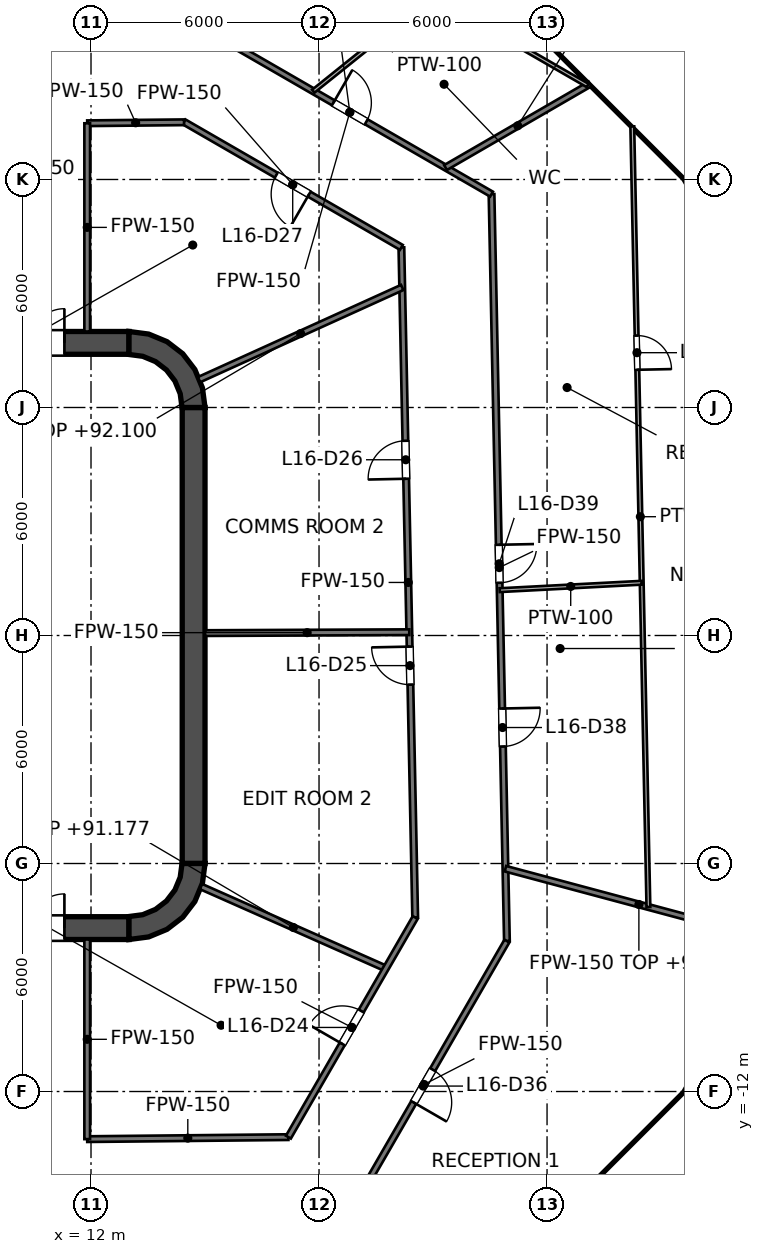
"""IFC4 building model, lengths in metres.
Left out: names, types, materials, properties, quantities, classifications, styles, units other than length and angle.
Written with IfcOpenShell. Run it as: python <this file> out.ifc"""

import sys

from ifc_helpers import new_model, si_unit, direction, frame, frame_2d, origin, place, context, subcontext, project, spatial, polyline, rectangle, outline, extrude, element, fill, save


model = new_model("IFC4")
c1 = context("Model", 3, precision=1e-05, world=origin(), true_north=direction((0.0, 1.0)))
c2 = subcontext(c1, "Body", "Model", "MODEL_VIEW")
j1 = project(units=[si_unit("LENGTHUNIT", "METRE"), si_unit("PLANEANGLEUNIT", "RADIAN")], contexts=[c1])
p1 = place(None, origin())
s1 = spatial("IfcSite", under=j1, at=p1, CompositionType="ELEMENT")
p2 = place(p1, origin())
s2 = spatial("IfcBuilding", under=s1, at=p2, CompositionType="ELEMENT")
p3 = place(p2, frame((0.0, 0.0, 88.2)))
s3 = spatial("IfcBuildingStorey", under=s2, at=p3, CompositionType="ELEMENT", Elevation=88.2)
p4 = place(p3, frame((-13.0, 7.7, 0.0), z_axis=(0.0, 0.0, 1.0), x_axis=(1.0, 0.0, 0.0)))
e1 = element("IfcWall", 1, at=p4, inside=s3, PredefinedType="SHEAR", context=c2, shape_type="SweptSolid", body=[
    extrude(rectangle(XDim=26.0, YDim=0.6, at=frame_2d((13.0, 0.0))), origin(), (0.0, 0.0, 1.0), 4.2),
])
p5 = place(p4, frame((1.7, 0.0, 0.0)))
e2 = element("IfcOpeningElement", 2, at=p5, cuts=e1, PredefinedType="OPENING", context=c2, shape_type="SweptSolid", body=[
    extrude(rectangle(XDim=1.8, YDim=2.1, at=frame_2d((0.9, 1.05))), frame((0.0, 0.3, 0.0), z_axis=(0.0, -1.0, 0.0), x_axis=(1.0, 0.0, 0.0)), (0.0, 0.0, 1.0), 0.6),
])
p6 = place(p4, frame((22.5, 0.0, 0.0)))
e3 = element("IfcOpeningElement", 3, at=p6, cuts=e1, PredefinedType="OPENING", context=c2, shape_type="SweptSolid", body=[
    extrude(rectangle(XDim=1.8, YDim=2.1, at=frame_2d((0.9, 1.05))), frame((0.0, 0.3, 0.0), z_axis=(0.0, -1.0, 0.0), x_axis=(1.0, 0.0, 0.0)), (0.0, 0.0, 1.0), 0.6),
])
p7 = place(p3, frame((-13.0, -7.7, 0.0), z_axis=(0.0, 0.0, 1.0), x_axis=(1.0, 0.0, 0.0)))
e4 = element("IfcWall", 4, at=p7, inside=s3, PredefinedType="SHEAR", context=c2, shape_type="SweptSolid", body=[
    extrude(rectangle(XDim=26.0, YDim=0.6, at=frame_2d((13.0, 0.0))), origin(), (0.0, 0.0, 1.0), 4.2),
])
p8 = place(p7, frame((1.7, 0.0, 0.0)))
e5 = element("IfcOpeningElement", 5, at=p8, cuts=e4, PredefinedType="OPENING", context=c2, shape_type="SweptSolid", body=[
    extrude(rectangle(XDim=1.8, YDim=2.1, at=frame_2d((0.9, 1.05))), frame((0.0, 0.3, 0.0), z_axis=(0.0, -1.0, 0.0), x_axis=(1.0, 0.0, 0.0)), (0.0, 0.0, 1.0), 0.6),
])
p9 = place(p7, frame((22.5, 0.0, 0.0)))
e6 = element("IfcOpeningElement", 6, at=p9, cuts=e4, PredefinedType="OPENING", context=c2, shape_type="SweptSolid", body=[
    extrude(rectangle(XDim=1.8, YDim=2.1, at=frame_2d((0.9, 1.05))), frame((0.0, 0.3, 0.0), z_axis=(0.0, -1.0, 0.0), x_axis=(1.0, 0.0, 0.0)), (0.0, 0.0, 1.0), 0.6),
])
p10 = place(p3, frame((14.7, -6.0, 0.0), z_axis=(0.0, 0.0, 1.0), x_axis=(0.0, 1.0, 0.0)))
e7 = element("IfcWall", 7, at=p10, inside=s3, PredefinedType="SHEAR", context=c2, shape_type="SweptSolid", body=[
    extrude(rectangle(XDim=12.0, YDim=0.6, at=frame_2d((6.0, 0.0))), origin(), (0.0, 0.0, 1.0), 4.2),
])
p11 = place(p3, origin())
e8 = element("IfcWall", 8, at=p11, inside=s3, PredefinedType="SHEAR", context=c2, shape_type="SweptSolid", body=[
    extrude(outline(polyline([(13.0, 8.0), (13.0, 7.395), (13.361, 7.347), (13.698, 7.208), (13.986, 6.986), (14.208, 6.698), (14.347, 6.361), (14.395, 6.0), (15.0, 6.0), (14.932, 6.518), (14.732, 7.0), (14.414, 7.414), (14.0, 7.732), (13.518, 7.932), (13.0, 8.0)])), origin(), (0.0, 0.0, 1.0), 4.2),
])
e9 = element("IfcWall", 9, at=p11, inside=s3, PredefinedType="SHEAR", context=c2, shape_type="SweptSolid", body=[
    extrude(outline(polyline([(15.0, -6.0), (14.395, -6.0), (14.347, -6.361), (14.208, -6.698), (13.986, -6.986), (13.698, -7.208), (13.361, -7.347), (13.0, -7.395), (13.0, -8.0), (13.518, -7.932), (14.0, -7.732), (14.414, -7.414), (14.732, -7.0), (14.932, -6.518), (15.0, -6.0)])), origin(), (0.0, 0.0, 1.0), 4.2),
])
p12 = place(p3, frame((11.8, -7.4, 0.0), z_axis=(0.0, 0.0, 1.0), x_axis=(0.0, 1.0, 0.0)))
e10 = element("IfcWall", 10, at=p12, inside=s3, PredefinedType="SOLIDWALL", context=c2, shape_type="SweptSolid", body=[
    extrude(rectangle(XDim=14.8, YDim=0.4, at=frame_2d((7.4, 0.0))), origin(), (0.0, 0.0, 1.0), 4.05),
])
p13 = place(p12, frame((11.2, 0.0, 0.0)))
e11 = element("IfcOpeningElement", 11, at=p13, cuts=e10, PredefinedType="OPENING", context=c2, shape_type="SweptSolid", body=[
    extrude(rectangle(XDim=1.1, YDim=2.1, at=frame_2d((0.55, 1.05))), frame((0.0, 0.2, 0.0), z_axis=(0.0, -1.0, 0.0), x_axis=(1.0, 0.0, 0.0)), (0.0, 0.0, 1.0), 0.4),
])
p14 = place(p12, frame((8.3, 0.0, 0.0)))
e12 = element("IfcOpeningElement", 12, at=p14, cuts=e10, PredefinedType="OPENING", context=c2, shape_type="SweptSolid", body=[
    extrude(rectangle(XDim=1.1, YDim=2.1, at=frame_2d((0.55, 1.05))), frame((0.0, 0.2, 0.0), z_axis=(0.0, -1.0, 0.0), x_axis=(1.0, 0.0, 0.0)), (0.0, 0.0, 1.0), 0.4),
])
p15 = place(p12, frame((5.4, 0.0, 0.0)))
e13 = element("IfcOpeningElement", 13, at=p15, cuts=e10, PredefinedType="OPENING", context=c2, shape_type="SweptSolid", body=[
    extrude(rectangle(XDim=1.1, YDim=2.1, at=frame_2d((0.55, 1.05))), frame((0.0, 0.2, 0.0), z_axis=(0.0, -1.0, 0.0), x_axis=(1.0, 0.0, 0.0)), (0.0, 0.0, 1.0), 0.4),
])
p16 = place(p12, frame((13.552, 0.0, 0.0)))
e14 = element("IfcOpeningElement", 14, at=p16, cuts=e10, PredefinedType="OPENING", context=c2, shape_type="SweptSolid", body=[
    extrude(rectangle(XDim=0.9, YDim=2.1, at=frame_2d((0.45, 1.05))), frame((0.0, 0.2, 0.0), z_axis=(0.0, -1.0, 0.0), x_axis=(1.0, 0.0, 0.0)), (0.0, 0.0, 1.0), 0.4),
])
p17 = place(p12, frame((0.347, 0.0, 0.0)))
e15 = element("IfcOpeningElement", 15, at=p17, cuts=e10, PredefinedType="OPENING", context=c2, shape_type="SweptSolid", body=[
    extrude(rectangle(XDim=0.9, YDim=2.1, at=frame_2d((0.45, 1.05))), frame((0.0, 0.2, 0.0), z_axis=(0.0, -1.0, 0.0), x_axis=(1.0, 0.0, 0.0)), (0.0, 0.0, 1.0), 0.4),
])
e16 = element("IfcWall", 16, at=p11, inside=s3, PredefinedType="SOLIDWALL", context=c2, shape_type="SweptSolid", body=[
    extrude(outline(polyline([(12.0, -5.675), (12.0, -5.925), (14.15, -5.925), (14.4, -5.925), (14.4, -5.675), (14.4, -3.025), (14.4, -2.775), (14.4, -0.125), (14.4, 0.125), (14.4, 2.775), (14.4, 3.025), (14.4, 5.675), (14.4, 5.925), (14.15, 5.925), (12.0, 5.925), (12.0, 5.675), (14.15, 5.675), (14.15, 3.025), (12.0, 3.025), (12.0, 2.775), (14.15, 2.775), (14.15, 0.125), (12.0, 0.125), (12.0, -0.125), (14.15, -0.125), (14.15, -2.775), (12.0, -2.775), (12.0, -3.025), (14.15, -3.025), (14.15, -5.675), (12.0, -5.675)])), origin(), (0.0, 0.0, 1.0), 4.05),
])
p18 = place(p3, frame((20.167, 10.213, 0.0), z_axis=(0.0, 0.0, 1.0), x_axis=(0.020610894613, -0.999787572949, 0.0)))
e17 = element("IfcWall", 17, at=p18, inside=s3, PredefinedType="PARTITIONING", context=c2, shape_type="SweptSolid", body=[
    extrude(rectangle(XDim=17.637, YDim=0.15, at=frame_2d((8.819, 0.0))), origin(), (0.0, 0.0, 1.0), 2.968),
])
p19 = place(p18, frame((10.508, 0.0, 0.0)))
e18 = element("IfcOpeningElement", 18, at=p19, cuts=e17, PredefinedType="OPENING", context=c2, shape_type="SweptSolid", body=[
    extrude(rectangle(XDim=1.0, YDim=2.1, at=frame_2d((0.5, 1.05))), frame((0.0, 0.075, 0.0), z_axis=(0.0, -1.0, 0.0), x_axis=(1.0, 0.0, 0.0)), (0.0, 0.0, 1.0), 0.15),
])
p20 = place(p18, frame((5.09, 0.0, 0.0)))
e19 = element("IfcOpeningElement", 19, at=p20, cuts=e17, PredefinedType="OPENING", context=c2, shape_type="SweptSolid", body=[
    extrude(rectangle(XDim=1.0, YDim=2.1, at=frame_2d((0.5, 1.05))), frame((0.0, 0.075, 0.0), z_axis=(0.0, -1.0, 0.0), x_axis=(1.0, 0.0, 0.0)), (0.0, 0.0, 1.0), 0.15),
])
p21 = place(p3, frame((22.539, 11.615, 0.0), z_axis=(0.0, 0.0, 1.0), x_axis=(0.020601506683, -0.99978776644, 0.0)))
e20 = element("IfcWall", 20, at=p21, inside=s3, PredefinedType="PARTITIONING", context=c2, shape_type="SweptSolid", body=[
    extrude(rectangle(XDim=19.66, YDim=0.15, at=frame_2d((9.83, 0.0))), origin(), (0.0, 0.0, 1.0), 2.968),
])
p22 = place(p21, frame((13.54, 0.0, 0.0)))
e21 = element("IfcOpeningElement", 21, at=p22, cuts=e20, PredefinedType="OPENING", context=c2, shape_type="SweptSolid", body=[
    extrude(rectangle(XDim=1.0, YDim=2.1, at=frame_2d((0.5, 1.05))), frame((0.0, 0.075, 0.0), z_axis=(0.0, -1.0, 0.0), x_axis=(1.0, 0.0, 0.0)), (0.0, 0.0, 1.0), 0.15),
])
p23 = place(p21, frame((9.23, 0.0, 0.0)))
e22 = element("IfcOpeningElement", 22, at=p23, cuts=e20, PredefinedType="OPENING", context=c2, shape_type="SweptSolid", body=[
    extrude(rectangle(XDim=1.0, YDim=2.1, at=frame_2d((0.5, 1.05))), frame((0.0, 0.075, 0.0), z_axis=(0.0, -1.0, 0.0), x_axis=(1.0, 0.0, 0.0)), (0.0, 0.0, 1.0), 0.15),
])
p24 = place(p3, frame((14.448, 13.515, 0.0), z_axis=(0.0, 0.0, 1.0), x_axis=(0.866032288321, -0.499988075443, 0.0)))
e23 = element("IfcWall", 23, at=p24, inside=s3, PredefinedType="PARTITIONING", context=c2, shape_type="SweptSolid", body=[
    extrude(rectangle(XDim=6.604, YDim=0.15, at=frame_2d((3.302, 0.0))), origin(), (0.0, 0.0, 1.0), 2.968),
])
p25 = place(p24, frame((2.802, 0.0, 0.0)))
e24 = element("IfcOpeningElement", 24, at=p25, cuts=e23, PredefinedType="OPENING", context=c2, shape_type="SweptSolid", body=[
    extrude(rectangle(XDim=1.0, YDim=2.1, at=frame_2d((0.5, 1.05))), frame((0.0, 0.075, 0.0), z_axis=(0.0, -1.0, 0.0), x_axis=(1.0, 0.0, 0.0)), (0.0, 0.0, 1.0), 0.15),
])
p26 = place(p3, frame((15.08, 15.921, 0.0), z_axis=(0.0, 0.0, 1.0), x_axis=(0.866020838546, -0.500007907142, 0.0)))
e25 = element("IfcWall", 25, at=p26, inside=s3, PredefinedType="PARTITIONING", context=c2, shape_type="SweptSolid", body=[
    extrude(rectangle(XDim=8.613, YDim=0.15, at=frame_2d((4.306, 0.0))), origin(), (0.0, 0.0, 1.0), 2.968),
])
p27 = place(p26, frame((3.807, 0.0, 0.0)))
e26 = element("IfcOpeningElement", 26, at=p27, cuts=e25, PredefinedType="OPENING", context=c2, shape_type="SweptSolid", body=[
    extrude(rectangle(XDim=1.0, YDim=2.1, at=frame_2d((0.5, 1.05))), frame((0.0, 0.075, 0.0), z_axis=(0.0, -1.0, 0.0), x_axis=(1.0, 0.0, 0.0)), (0.0, 0.0, 1.0), 0.15),
])
p28 = place(p3, frame((14.895, -6.607, 0.0), z_axis=(0.0, 0.0, 1.0), x_axis=(0.914233271379, -0.405188259337, 0.0)))
e27 = element("IfcWall", 27, at=p28, inside=s3, PredefinedType="PARTITIONING", context=c2, shape_type="SweptSolid", body=[
    extrude(rectangle(XDim=5.317, YDim=0.15, at=frame_2d((2.659, 0.0))), origin(), (0.0, 0.0, 1.0), 2.977),
])
p29 = place(p3, frame((22.905, -6.137, 0.0), z_axis=(0.0, 0.0, 1.0), x_axis=(0.965915974273, -0.258855810529, 0.0)))
e28 = element("IfcWall", 28, at=p29, inside=s3, PredefinedType="PARTITIONING", context=c2, shape_type="SweptSolid", body=[
    extrude(rectangle(XDim=7.271, YDim=0.15, at=frame_2d((3.635, 0.0))), origin(), (0.0, 0.0, 1.0), 3.727),
])
p30 = place(p3, frame((15.0, 0.063, 0.0), z_axis=(0.0, 0.0, 1.0), x_axis=(0.999990294223, 0.004405843865, 0.0)))
e29 = element("IfcWall", 29, at=p30, inside=s3, PredefinedType="PARTITIONING", context=c2, shape_type="SweptSolid", body=[
    extrude(rectangle(XDim=5.375, YDim=0.15, at=frame_2d((2.688, 0.0))), origin(), (0.0, 0.0, 1.0), 2.968),
])
p31 = place(p3, frame((11.9, -13.253, 0.0), z_axis=(0.0, 0.0, 1.0), x_axis=(0.999950853109, 0.009914200296, 0.0)))
e30 = element("IfcWall", 30, at=p31, inside=s3, PredefinedType="PARTITIONING", context=c2, shape_type="SweptSolid", body=[
    extrude(rectangle(XDim=5.294, YDim=0.15, at=frame_2d((2.647, 0.0))), origin(), (0.0, 0.0, 1.0), 2.968),
])
p32 = place(p3, frame((11.9, 13.48, 0.0), z_axis=(0.0, 0.0, 1.0), x_axis=(0.999950357576, 0.009964054536, 0.0)))
e31 = element("IfcWall", 31, at=p32, inside=s3, PredefinedType="PARTITIONING", context=c2, shape_type="SweptSolid", body=[
    extrude(rectangle(XDim=2.548, YDim=0.15, at=frame_2d((1.274, 0.0))), origin(), (0.0, 0.0, 1.0), 2.968),
])
p33 = place(p3, frame((14.843, 6.733, 0.0), z_axis=(0.0, 0.0, 1.0), x_axis=(0.910628361306, 0.413226315214, 0.0)))
e32 = element("IfcWall", 32, at=p33, inside=s3, PredefinedType="PARTITIONING", context=c2, shape_type="SweptSolid", body=[
    extrude(rectangle(XDim=5.87, YDim=0.15, at=frame_2d((2.935, 0.0))), origin(), (0.0, 0.0, 1.0), 3.9),
])
p34 = place(p3, frame((21.329, 12.314, 0.0), z_axis=(0.0, 0.0, 1.0), x_axis=(0.865416132284, 0.501053807472, 0.0)))
e33 = element("IfcWall", 33, at=p34, inside=s3, PredefinedType="PARTITIONING", context=c2, shape_type="SweptSolid", body=[
    extrude(rectangle(XDim=4.39, YDim=0.15, at=frame_2d((2.195, 0.0))), origin(), (0.0, 0.0, 1.0), 3.045),
])
p35 = place(p3, frame((18.587, -15.587, 0.0), z_axis=(0.0, 0.0, 1.0), x_axis=(0.500026433136, 0.866010142069, 0.0)))
e34 = element("IfcWall", 34, at=p35, inside=s3, PredefinedType="PARTITIONING", context=c2, shape_type="SweptSolid", body=[
    extrude(rectangle(XDim=8.713, YDim=0.15, at=frame_2d((4.357, 0.0))), origin(), (0.0, 0.0, 1.0), 2.968),
])
p36 = place(p35, frame((3.807, 0.0, 0.0)))
e35 = element("IfcOpeningElement", 35, at=p36, cuts=e34, PredefinedType="OPENING", context=c2, shape_type="SweptSolid", body=[
    extrude(rectangle(XDim=1.0, YDim=2.1, at=frame_2d((0.5, 1.05))), frame((0.0, 0.075, 0.0), z_axis=(0.0, -1.0, 0.0), x_axis=(1.0, 0.0, 0.0)), (0.0, 0.0, 1.0), 0.15),
])
p37 = place(p3, frame((17.194, -13.201, 0.0), z_axis=(0.0, 0.0, 1.0), x_axis=(0.50001062018, 0.866019272134, 0.0)))
e36 = element("IfcWall", 36, at=p37, inside=s3, PredefinedType="PARTITIONING", context=c2, shape_type="SweptSolid", body=[
    extrude(rectangle(XDim=6.674, YDim=0.15, at=frame_2d((3.337, 0.0))), origin(), (0.0, 0.0, 1.0), 2.968),
])
p38 = place(p37, frame((2.833, 0.0, 0.0)))
e37 = element("IfcOpeningElement", 37, at=p38, cuts=e36, PredefinedType="OPENING", context=c2, shape_type="SweptSolid", body=[
    extrude(rectangle(XDim=1.0, YDim=2.1, at=frame_2d((0.5, 1.05))), frame((0.0, 0.075, 0.0), z_axis=(0.0, -1.0, 0.0), x_axis=(1.0, 0.0, 0.0)), (0.0, 0.0, 1.0), 0.15),
])
p39 = place(p3, frame((11.9, -13.253, 0.0), z_axis=(0.0, 0.0, 1.0), x_axis=(0.0, 1.0, 0.0)))
e38 = element("IfcWall", 38, at=p39, inside=s3, PredefinedType="PARTITIONING", context=c2, shape_type="SweptSolid", body=[
    extrude(rectangle(XDim=5.253, YDim=0.15, at=frame_2d((2.626, 0.0))), origin(), (0.0, 0.0, 1.0), 2.968),
])
p40 = place(p3, frame((11.9, 8.0, 0.0), z_axis=(0.0, 0.0, 1.0), x_axis=(0.0, 1.0, 0.0)))
e39 = element("IfcWall", 39, at=p40, inside=s3, PredefinedType="PARTITIONING", context=c2, shape_type="SweptSolid", body=[
    extrude(rectangle(XDim=5.479, YDim=0.15, at=frame_2d((2.74, 0.0))), origin(), (0.0, 0.0, 1.0), 2.968),
])
p41 = place(p3, frame((26.243, 13.397, 0.0), z_axis=(0.0, 0.0, 1.0), x_axis=(0.020639766813, -0.999786977324, 0.0)))
e40 = element("IfcWall", 40, at=p41, inside=s3, PredefinedType="PARTITIONING", context=c2, shape_type="SweptSolid", body=[
    extrude(rectangle(XDim=20.546, YDim=0.1, at=frame_2d((10.273, 0.0))), origin(), (0.0, 0.0, 1.0), 2.968),
])
p42 = place(p41, frame((5.506, 0.0, 0.0)))
e41 = element("IfcOpeningElement", 41, at=p42, cuts=e40, PredefinedType="OPENING", context=c2, shape_type="SweptSolid", body=[
    extrude(rectangle(XDim=0.9, YDim=2.1, at=frame_2d((0.45, 1.05))), frame((0.0, 0.05, 0.0), z_axis=(0.0, -1.0, 0.0), x_axis=(1.0, 0.0, 0.0)), (0.0, 0.0, 1.0), 0.1),
])
p43 = place(p3, frame((16.065, 19.671, 0.0), z_axis=(0.0, 0.0, 1.0), x_axis=(0.866058502288, -0.499942667328, 0.0)))
e42 = element("IfcWall", 42, at=p43, inside=s3, PredefinedType="PARTITIONING", context=c2, shape_type="SweptSolid", body=[
    extrude(rectangle(XDim=10.397, YDim=0.1, at=frame_2d((5.198, 0.0))), origin(), (0.0, 0.0, 1.0), 2.968),
])
p44 = place(p3, frame((22.754, 1.193, 0.0), z_axis=(0.0, 0.0, 1.0), x_axis=(0.998643838338, 0.05206231025, 0.0)))
e43 = element("IfcWall", 43, at=p44, inside=s3, PredefinedType="PARTITIONING", context=c2, shape_type="SweptSolid", body=[
    extrude(rectangle(XDim=3.742, YDim=0.1, at=frame_2d((1.871, 0.0))), origin(), (0.0, 0.0, 1.0), 3.9),
])
p45 = place(p3, frame((17.849, 14.323, 0.0), z_axis=(0.0, 0.0, 1.0), x_axis=(0.7800073623, 0.625770337071, 0.0)))
e44 = element("IfcWall", 44, at=p45, inside=s3, PredefinedType="PARTITIONING", context=c2, shape_type="SweptSolid", body=[
    extrude(rectangle(XDim=4.013, YDim=0.1, at=frame_2d((2.006, 0.0))), origin(), (0.0, 0.0, 1.0), 3.9),
])
p46 = place(p13, origin())
e45 = element("IfcDoor", 45, at=p46, inside=s3, OperationType="DOUBLE_DOOR_SLIDING", PredefinedType="DOOR", context=c2, shape_type="SweptSolid", body=[
    extrude(rectangle(XDim=1.1, YDim=2.1, at=frame_2d((0.55, 1.05))), frame((0.0, 0.025, 0.0), z_axis=(0.0, -1.0, 0.0), x_axis=(1.0, 0.0, 0.0)), (0.0, 0.0, 1.0), 0.05),
])
fill(e11, e45)
p47 = place(p14, origin())
e46 = element("IfcDoor", 46, at=p47, inside=s3, OperationType="DOUBLE_DOOR_SLIDING", PredefinedType="DOOR", context=c2, shape_type="SweptSolid", body=[
    extrude(rectangle(XDim=1.1, YDim=2.1, at=frame_2d((0.55, 1.05))), frame((0.0, 0.025, 0.0), z_axis=(0.0, -1.0, 0.0), x_axis=(1.0, 0.0, 0.0)), (0.0, 0.0, 1.0), 0.05),
])
fill(e12, e46)
p48 = place(p15, origin())
e47 = element("IfcDoor", 47, at=p48, inside=s3, OperationType="DOUBLE_DOOR_SLIDING", PredefinedType="DOOR", context=c2, shape_type="SweptSolid", body=[
    extrude(rectangle(XDim=1.1, YDim=2.1, at=frame_2d((0.55, 1.05))), frame((0.0, 0.025, 0.0), z_axis=(0.0, -1.0, 0.0), x_axis=(1.0, 0.0, 0.0)), (0.0, 0.0, 1.0), 0.05),
])
fill(e13, e47)
p49 = place(p16, origin())
e48 = element("IfcDoor", 48, at=p49, inside=s3, OperationType="SINGLE_SWING_RIGHT", PredefinedType="DOOR", context=c2, shape_type="SweptSolid", body=[
    extrude(rectangle(XDim=0.9, YDim=2.1, at=frame_2d((0.45, 1.05))), frame((0.0, 0.025, 0.0), z_axis=(0.0, -1.0, 0.0), x_axis=(1.0, 0.0, 0.0)), (0.0, 0.0, 1.0), 0.05),
])
fill(e14, e48)
p50 = place(p17, origin())
e49 = element("IfcDoor", 49, at=p50, inside=s3, OperationType="SINGLE_SWING_RIGHT", PredefinedType="DOOR", context=c2, shape_type="SweptSolid", body=[
    extrude(rectangle(XDim=0.9, YDim=2.1, at=frame_2d((0.45, 1.05))), frame((0.0, 0.025, 0.0), z_axis=(0.0, -1.0, 0.0), x_axis=(1.0, 0.0, 0.0)), (0.0, 0.0, 1.0), 0.05),
])
fill(e15, e49)
p51 = place(p6, origin())
e50 = element("IfcDoor", 50, at=p51, inside=s3, OperationType="DOUBLE_DOOR_SINGLE_SWING", PredefinedType="DOOR", context=c2, shape_type="SweptSolid", body=[
    extrude(rectangle(XDim=1.8, YDim=2.1, at=frame_2d((0.9, 1.05))), frame((0.0, 0.025, 0.0), z_axis=(0.0, -1.0, 0.0), x_axis=(1.0, 0.0, 0.0)), (0.0, 0.0, 1.0), 0.05),
])
fill(e3, e50)
p52 = place(p9, origin())
e51 = element("IfcDoor", 51, at=p52, inside=s3, OperationType="DOUBLE_DOOR_SINGLE_SWING", PredefinedType="DOOR", context=c2, shape_type="SweptSolid", body=[
    extrude(rectangle(XDim=1.8, YDim=2.1, at=frame_2d((0.9, 1.05))), frame((0.0, 0.025, 0.0), z_axis=(0.0, -1.0, 0.0), x_axis=(1.0, 0.0, 0.0)), (0.0, 0.0, 1.0), 0.05),
])
fill(e6, e51)
p53 = place(p38, origin())
e52 = element("IfcDoor", 52, at=p53, inside=s3, OperationType="SINGLE_SWING_LEFT", PredefinedType="DOOR", context=c2, shape_type="SweptSolid", body=[
    extrude(rectangle(XDim=1.0, YDim=2.1, at=frame_2d((0.5, 1.05))), frame((0.0, 0.025, 0.0), z_axis=(0.0, -1.0, 0.0), x_axis=(1.0, 0.0, 0.0)), (0.0, 0.0, 1.0), 0.05),
])
fill(e37, e52)
p54 = place(p19, origin())
e53 = element("IfcDoor", 53, at=p54, inside=s3, OperationType="SINGLE_SWING_LEFT", PredefinedType="DOOR", context=c2, shape_type="SweptSolid", body=[
    extrude(rectangle(XDim=1.0, YDim=2.1, at=frame_2d((0.5, 1.05))), frame((0.0, 0.025, 0.0), z_axis=(0.0, -1.0, 0.0), x_axis=(1.0, 0.0, 0.0)), (0.0, 0.0, 1.0), 0.05),
])
fill(e18, e53)
p55 = place(p20, origin())
e54 = element("IfcDoor", 54, at=p55, inside=s3, OperationType="SINGLE_SWING_RIGHT", PredefinedType="DOOR", context=c2, shape_type="SweptSolid", body=[
    extrude(rectangle(XDim=1.0, YDim=2.1, at=frame_2d((0.5, 1.05))), frame((0.0, 0.025, 0.0), z_axis=(0.0, -1.0, 0.0), x_axis=(1.0, 0.0, 0.0)), (0.0, 0.0, 1.0), 0.05),
])
fill(e19, e54)
p56 = place(p25, origin())
e55 = element("IfcDoor", 55, at=p56, inside=s3, OperationType="SINGLE_SWING_RIGHT", PredefinedType="DOOR", context=c2, shape_type="SweptSolid", body=[
    extrude(rectangle(XDim=1.0, YDim=2.1, at=frame_2d((0.5, 1.05))), frame((0.0, 0.025, 0.0), z_axis=(0.0, -1.0, 0.0), x_axis=(1.0, 0.0, 0.0)), (0.0, 0.0, 1.0), 0.05),
])
fill(e24, e55)
p57 = place(p36, origin())
e56 = element("IfcDoor", 56, at=p57, inside=s3, OperationType="SINGLE_SWING_LEFT", PredefinedType="DOOR", context=c2, shape_type="SweptSolid", body=[
    extrude(rectangle(XDim=1.0, YDim=2.1, at=frame_2d((0.5, 1.05))), frame((0.0, 0.025, 0.0), z_axis=(0.0, -1.0, 0.0), x_axis=(1.0, 0.0, 0.0)), (0.0, 0.0, 1.0), 0.05),
])
fill(e35, e56)
p58 = place(p22, origin())
e57 = element("IfcDoor", 57, at=p58, inside=s3, OperationType="SINGLE_SWING_LEFT", PredefinedType="DOOR", context=c2, shape_type="SweptSolid", body=[
    extrude(rectangle(XDim=1.0, YDim=2.1, at=frame_2d((0.5, 1.05))), frame((0.0, 0.025, 0.0), z_axis=(0.0, -1.0, 0.0), x_axis=(1.0, 0.0, 0.0)), (0.0, 0.0, 1.0), 0.05),
])
fill(e21, e57)
p59 = place(p23, origin())
e58 = element("IfcDoor", 58, at=p59, inside=s3, OperationType="SINGLE_SWING_LEFT", PredefinedType="DOOR", context=c2, shape_type="SweptSolid", body=[
    extrude(rectangle(XDim=1.0, YDim=2.1, at=frame_2d((0.5, 1.05))), frame((0.0, 0.025, 0.0), z_axis=(0.0, -1.0, 0.0), x_axis=(1.0, 0.0, 0.0)), (0.0, 0.0, 1.0), 0.05),
])
fill(e22, e58)
p60 = place(p42, origin())
e59 = element("IfcDoor", 59, at=p60, inside=s3, OperationType="SINGLE_SWING_RIGHT", PredefinedType="DOOR", context=c2, shape_type="SweptSolid", body=[
    extrude(rectangle(XDim=0.9, YDim=2.1, at=frame_2d((0.45, 1.05))), frame((0.0, 0.025, 0.0), z_axis=(0.0, -1.0, 0.0), x_axis=(1.0, 0.0, 0.0)), (0.0, 0.0, 1.0), 0.05),
])
fill(e41, e59)
p61 = place(p27, origin())
e60 = element("IfcDoor", 60, at=p61, inside=s3, OperationType="SINGLE_SWING_LEFT", PredefinedType="DOOR", context=c2, shape_type="SweptSolid", body=[
    extrude(rectangle(XDim=1.0, YDim=2.1, at=frame_2d((0.5, 1.05))), frame((0.0, 0.025, 0.0), z_axis=(0.0, -1.0, 0.0), x_axis=(1.0, 0.0, 0.0)), (0.0, 0.0, 1.0), 0.05),
])
fill(e26, e60)
save(model, sys.argv[1])
